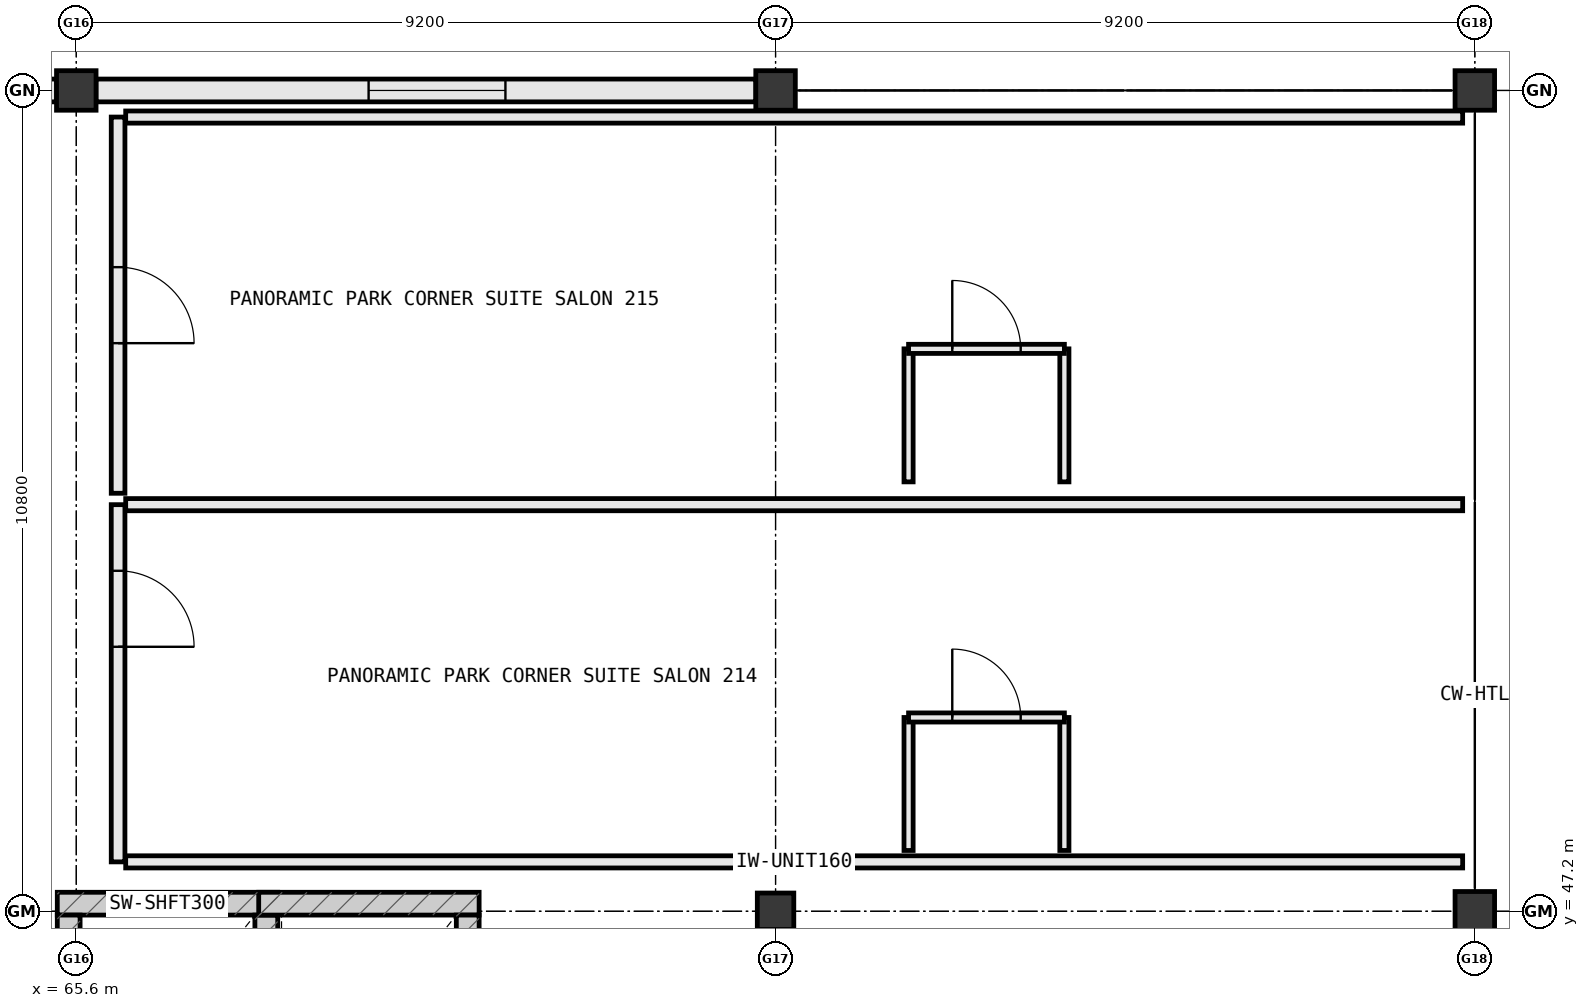
"""IFC4 building model, lengths in metres.
Left out: names, types, materials, properties, quantities, classifications, styles, units other than length and angle.
Written with IfcOpenShell. Run it as: python <this file> out.ifc"""

import sys

from ifc_helpers import new_model, si_unit, direction, frame, frame_2d, origin, origin_2d, place, context, subcontext, project, spatial, rectangle, extrude, element, fill, save


model = new_model("IFC4")
c1 = context("Model", 3, precision=1e-05, world=origin(), true_north=direction((0.0, 1.0)))
c2 = subcontext(c1, "Body", "Model", "MODEL_VIEW")
j1 = project(units=[si_unit("LENGTHUNIT", "METRE"), si_unit("PLANEANGLEUNIT", "RADIAN")], contexts=[c1])
p1 = place(None, origin())
s1 = spatial("IfcSite", under=j1, at=p1, CompositionType="ELEMENT")
p2 = place(p1, origin())
s2 = spatial("IfcBuilding", under=s1, at=p2, CompositionType="ELEMENT")
p3 = place(p2, frame((0.0, 0.0, 27.6)))
s3 = spatial("IfcBuildingStorey", under=s2, at=p3, CompositionType="ELEMENT", Elevation=27.6)
p4 = place(p3, frame((74.8, 47.2, 0.0), z_axis=(0.0, 0.0, 1.0), x_axis=(1.0, 0.0, 0.0)))
e1 = element("IfcColumn", 1, at=p4, inside=s3, PredefinedType="COLUMN", context=c2, shape_type="SweptSolid", body=[
    extrude(rectangle(XDim=0.48, YDim=0.48, at=origin_2d()), origin(), (0.0, 0.0, 1.0), 3.8),
])
for number, where, z_axis, x_axis in (
    (2, (74.8, 58.0, 0.0), (0.0, 0.0, 1.0), (1.0, 0.0, 0.0)),
    (3, (84.0, 47.2, 0.0), (0.0, 0.0, 1.0), (1.0, 0.0, 0.0)),
    (4, (84.0, 58.0, 0.0), (0.0, 0.0, 1.0), (1.0, 0.0, 0.0)),
    (5, (65.6, 58.0, 0.0), (0.0, 0.0, 1.0), (1.0, 0.0, 0.0)),
):
    element("IfcColumn", number, at=place(p3, frame(where, z_axis=z_axis, x_axis=x_axis)), inside=s3, PredefinedType="COLUMN", context=c2, shape_type="SweptSolid", body=[
        extrude(rectangle(XDim=0.52, YDim=0.52, at=origin_2d()), origin(), (0.0, 0.0, 1.0), 3.8),
    ])
p5 = place(p3, frame((74.542, 58.0, 0.0), z_axis=(0.0, 0.0, 1.0), x_axis=(-1.0, 0.0, 0.0)))
e6 = element("IfcWall", 6, at=p5, inside=s3, PredefinedType="STANDARD", context=c2, shape_type="SweptSolid", body=[
    extrude(rectangle(XDim=8.684, YDim=0.3, at=frame_2d((4.342, 0.0))), origin(), (0.0, 0.0, 1.0), 2.87),
])
p6 = place(p5, frame((3.296, 0.0, 0.85)))
e7 = element("IfcOpeningElement", 7, at=p6, cuts=e6, PredefinedType="OPENING", context=c2, shape_type="SweptSolid", body=[
    extrude(rectangle(XDim=1.8, YDim=1.85, at=frame_2d((0.9, 0.925))), frame((0.0, 0.162, 0.0), z_axis=(0.0, -1.0, 0.0), x_axis=(1.0, 0.0, 0.0)), (0.0, 0.0, 1.0), 0.324),
])
p7 = place(p3, frame((65.342, 58.0, 0.0), z_axis=(0.0, 0.0, 1.0), x_axis=(-1.0, 0.0, 0.0)))
e8 = element("IfcWall", 8, at=p7, inside=s3, PredefinedType="STANDARD", context=c2, shape_type="SweptSolid", body=[
    extrude(rectangle(XDim=4.284, YDim=0.3, at=frame_2d((2.142, 0.0))), origin(), (0.0, 0.0, 1.0), 2.87),
])
p8 = place(p7, frame((1.317, 0.0, 0.85)))
e9 = element("IfcOpeningElement", 9, at=p8, cuts=e8, PredefinedType="OPENING", context=c2, shape_type="SweptSolid", body=[
    extrude(rectangle(XDim=1.65, YDim=1.8, at=frame_2d((0.825, 0.9))), frame((0.0, 0.162, 0.0), z_axis=(0.0, -1.0, 0.0), x_axis=(1.0, 0.0, 0.0)), (0.0, 0.0, 1.0), 0.324),
])
for number, where, z_axis, x_axis in (
    (10, (68.25, 47.3, 0.0), (0.0, 0.0, 1.0), (-1.0, 0.0, 0.0)),
    (11, (68.1, 44.25, 0.0), (0.0, 0.0, 1.0), (0.0, 1.0, 0.0)),
    (12, (65.5, 47.15, 0.0), (0.0, 0.0, 1.0), (0.0, -1.0, 0.0)),
    (13, (70.9, 47.3, 0.0), (0.0, 0.0, 1.0), (-1.0, 0.0, 0.0)),
    (14, (70.75, 44.25, 0.0), (0.0, 0.0, 1.0), (0.0, 1.0, 0.0)),
):
    element("IfcWall", number, at=place(p3, frame(where, z_axis=z_axis, x_axis=x_axis)), inside=s3, PredefinedType="SHEAR", context=c2, shape_type="SweptSolid", body=[
        extrude(rectangle(XDim=2.9, YDim=0.3, at=frame_2d((1.45, 0.0))), origin(), (0.0, 0.0, 1.0), 3.8),
    ])
p9 = place(p3, frame((66.15, 52.55, 0.0), z_axis=(0.0, 0.0, 1.0), x_axis=(0.0, -1.0, 0.0)))
e15 = element("IfcWall", 15, at=p9, inside=s3, PredefinedType="PARTITIONING", context=c2, shape_type="SweptSolid", body=[
    extrude(rectangle(XDim=4.7, YDim=0.18, at=frame_2d((2.35, 0.0))), origin(), (0.0, 0.0, 1.0), 3.555),
])
p10 = place(p9, frame((0.87, 0.0, 0.0)))
e16 = element("IfcOpeningElement", 16, at=p10, cuts=e15, PredefinedType="OPENING", context=c2, shape_type="SweptSolid", body=[
    extrude(rectangle(XDim=1.0, YDim=2.2, at=frame_2d((0.5, 1.1))), frame((0.0, 0.102, 0.0), z_axis=(0.0, -1.0, 0.0), x_axis=(1.0, 0.0, 0.0)), (0.0, 0.0, 1.0), 0.204),
])
for number, where, z_axis, x_axis in (
    (17, (66.25, 47.85, 0.0), (0.0, 0.0, 1.0), (1.0, 0.0, 0.0)),
    (18, (66.25, 52.55, 0.0), (0.0, 0.0, 1.0), (1.0, 0.0, 0.0)),
):
    element("IfcWall", number, at=place(p3, frame(where, z_axis=z_axis, x_axis=x_axis)), inside=s3, PredefinedType="PARTITIONING", context=c2, shape_type="SweptSolid", body=[
        extrude(rectangle(XDim=17.59, YDim=0.16, at=frame_2d((8.795, 0.0))), origin(), (0.0, 0.0, 1.0), 3.555),
    ])
for number, where, z_axis, x_axis in (
    (19, (76.55, 48.0, 0.0), (0.0, 0.0, 1.0), (0.0, 1.0, 0.0)),
    (20, (78.6, 48.0, 0.0), (0.0, 0.0, 1.0), (0.0, 1.0, 0.0)),
):
    element("IfcWall", number, at=place(p3, frame(where, z_axis=z_axis, x_axis=x_axis)), inside=s3, PredefinedType="PARTITIONING", context=c2, shape_type="SweptSolid", body=[
        extrude(rectangle(XDim=1.75, YDim=0.12, at=frame_2d((0.875, 0.0))), origin(), (0.0, 0.0, 1.0), 3.555),
    ])
p11 = place(p3, frame((76.55, 49.75, 0.0), z_axis=(0.0, 0.0, 1.0), x_axis=(1.0, 0.0, 0.0)))
e21 = element("IfcWall", 21, at=p11, inside=s3, PredefinedType="PARTITIONING", context=c2, shape_type="SweptSolid", body=[
    extrude(rectangle(XDim=2.05, YDim=0.12, at=frame_2d((1.025, 0.0))), origin(), (0.0, 0.0, 1.0), 3.555),
])
p12 = place(p11, frame((0.575, 0.0, 0.0)))
e22 = element("IfcOpeningElement", 22, at=p12, cuts=e21, PredefinedType="OPENING", context=c2, shape_type="SweptSolid", body=[
    extrude(rectangle(XDim=0.9, YDim=2.15, at=frame_2d((0.45, 1.075))), frame((0.0, 0.072, 0.0), z_axis=(0.0, -1.0, 0.0), x_axis=(1.0, 0.0, 0.0)), (0.0, 0.0, 1.0), 0.144),
])
p13 = place(p3, frame((66.15, 57.65, 0.0), z_axis=(0.0, 0.0, 1.0), x_axis=(0.0, -1.0, 0.0)))
e23 = element("IfcWall", 23, at=p13, inside=s3, PredefinedType="PARTITIONING", context=c2, shape_type="SweptSolid", body=[
    extrude(rectangle(XDim=4.95, YDim=0.18, at=frame_2d((2.475, 0.0))), origin(), (0.0, 0.0, 1.0), 3.555),
])
p14 = place(p13, frame((1.975, 0.0, 0.0)))
e24 = element("IfcOpeningElement", 24, at=p14, cuts=e23, PredefinedType="OPENING", context=c2, shape_type="SweptSolid", body=[
    extrude(rectangle(XDim=1.0, YDim=2.2, at=frame_2d((0.5, 1.1))), frame((0.0, 0.102, 0.0), z_axis=(0.0, -1.0, 0.0), x_axis=(1.0, 0.0, 0.0)), (0.0, 0.0, 1.0), 0.204),
])
p15 = place(p3, frame((66.25, 57.65, 0.0), z_axis=(0.0, 0.0, 1.0), x_axis=(1.0, 0.0, 0.0)))
e25 = element("IfcWall", 25, at=p15, inside=s3, PredefinedType="PARTITIONING", context=c2, shape_type="SweptSolid", body=[
    extrude(rectangle(XDim=17.59, YDim=0.16, at=frame_2d((8.795, 0.0))), origin(), (0.0, 0.0, 1.0), 2.87),
])
for number, where, z_axis, x_axis in (
    (26, (76.55, 52.85, 0.0), (0.0, 0.0, 1.0), (0.0, 1.0, 0.0)),
    (27, (78.6, 52.85, 0.0), (0.0, 0.0, 1.0), (0.0, 1.0, 0.0)),
):
    element("IfcWall", number, at=place(p3, frame(where, z_axis=z_axis, x_axis=x_axis)), inside=s3, PredefinedType="PARTITIONING", context=c2, shape_type="SweptSolid", body=[
        extrude(rectangle(XDim=1.75, YDim=0.12, at=frame_2d((0.875, 0.0))), origin(), (0.0, 0.0, 1.0), 3.555),
    ])
p16 = place(p3, frame((76.55, 54.6, 0.0), z_axis=(0.0, 0.0, 1.0), x_axis=(1.0, 0.0, 0.0)))
e28 = element("IfcWall", 28, at=p16, inside=s3, PredefinedType="PARTITIONING", context=c2, shape_type="SweptSolid", body=[
    extrude(rectangle(XDim=2.05, YDim=0.12, at=frame_2d((1.025, 0.0))), origin(), (0.0, 0.0, 1.0), 3.555),
])
p17 = place(p16, frame((0.575, 0.0, 0.0)))
e29 = element("IfcOpeningElement", 29, at=p17, cuts=e28, PredefinedType="OPENING", context=c2, shape_type="SweptSolid", body=[
    extrude(rectangle(XDim=0.9, YDim=2.15, at=frame_2d((0.45, 1.075))), frame((0.0, 0.072, 0.0), z_axis=(0.0, -1.0, 0.0), x_axis=(1.0, 0.0, 0.0)), (0.0, 0.0, 1.0), 0.144),
])
p18 = place(p6, origin())
e30 = element("IfcWindow", 30, at=p18, inside=s3, PartitioningType="SINGLE_PANEL", PredefinedType="WINDOW", context=c2, shape_type="SweptSolid", body=[
    extrude(rectangle(XDim=1.8, YDim=1.85, at=frame_2d((0.9, 0.925))), frame((0.0, 0.03, 0.0), z_axis=(0.0, -1.0, 0.0), x_axis=(1.0, 0.0, 0.0)), (0.0, 0.0, 1.0), 0.06),
])
fill(e7, e30)
p19 = place(p10, origin())
e31 = element("IfcDoor", 31, at=p19, inside=s3, OperationType="SINGLE_SWING_RIGHT", PredefinedType="DOOR", context=c2, shape_type="SweptSolid", body=[
    extrude(rectangle(XDim=1.0, YDim=2.2, at=frame_2d((0.5, 1.1))), frame((0.0, 0.025, 0.0), z_axis=(0.0, -1.0, 0.0), x_axis=(1.0, 0.0, 0.0)), (0.0, 0.0, 1.0), 0.05),
])
fill(e16, e31)
p20 = place(p12, origin())
e32 = element("IfcDoor", 32, at=p20, inside=s3, OperationType="SINGLE_SWING_LEFT", PredefinedType="DOOR", context=c2, shape_type="SweptSolid", body=[
    extrude(rectangle(XDim=0.9, YDim=2.15, at=frame_2d((0.45, 1.075))), frame((0.0, 0.025, 0.0), z_axis=(0.0, -1.0, 0.0), x_axis=(1.0, 0.0, 0.0)), (0.0, 0.0, 1.0), 0.05),
])
fill(e22, e32)
p21 = place(p14, origin())
e33 = element("IfcDoor", 33, at=p21, inside=s3, OperationType="SINGLE_SWING_RIGHT", PredefinedType="DOOR", context=c2, shape_type="SweptSolid", body=[
    extrude(rectangle(XDim=1.0, YDim=2.2, at=frame_2d((0.5, 1.1))), frame((0.0, 0.025, 0.0), z_axis=(0.0, -1.0, 0.0), x_axis=(1.0, 0.0, 0.0)), (0.0, 0.0, 1.0), 0.05),
])
fill(e24, e33)
p22 = place(p17, origin())
e34 = element("IfcDoor", 34, at=p22, inside=s3, OperationType="SINGLE_SWING_LEFT", PredefinedType="DOOR", context=c2, shape_type="SweptSolid", body=[
    extrude(rectangle(XDim=0.9, YDim=2.15, at=frame_2d((0.45, 1.075))), frame((0.0, 0.025, 0.0), z_axis=(0.0, -1.0, 0.0), x_axis=(1.0, 0.0, 0.0)), (0.0, 0.0, 1.0), 0.05),
])
fill(e29, e34)
save(model, sys.argv[1])
